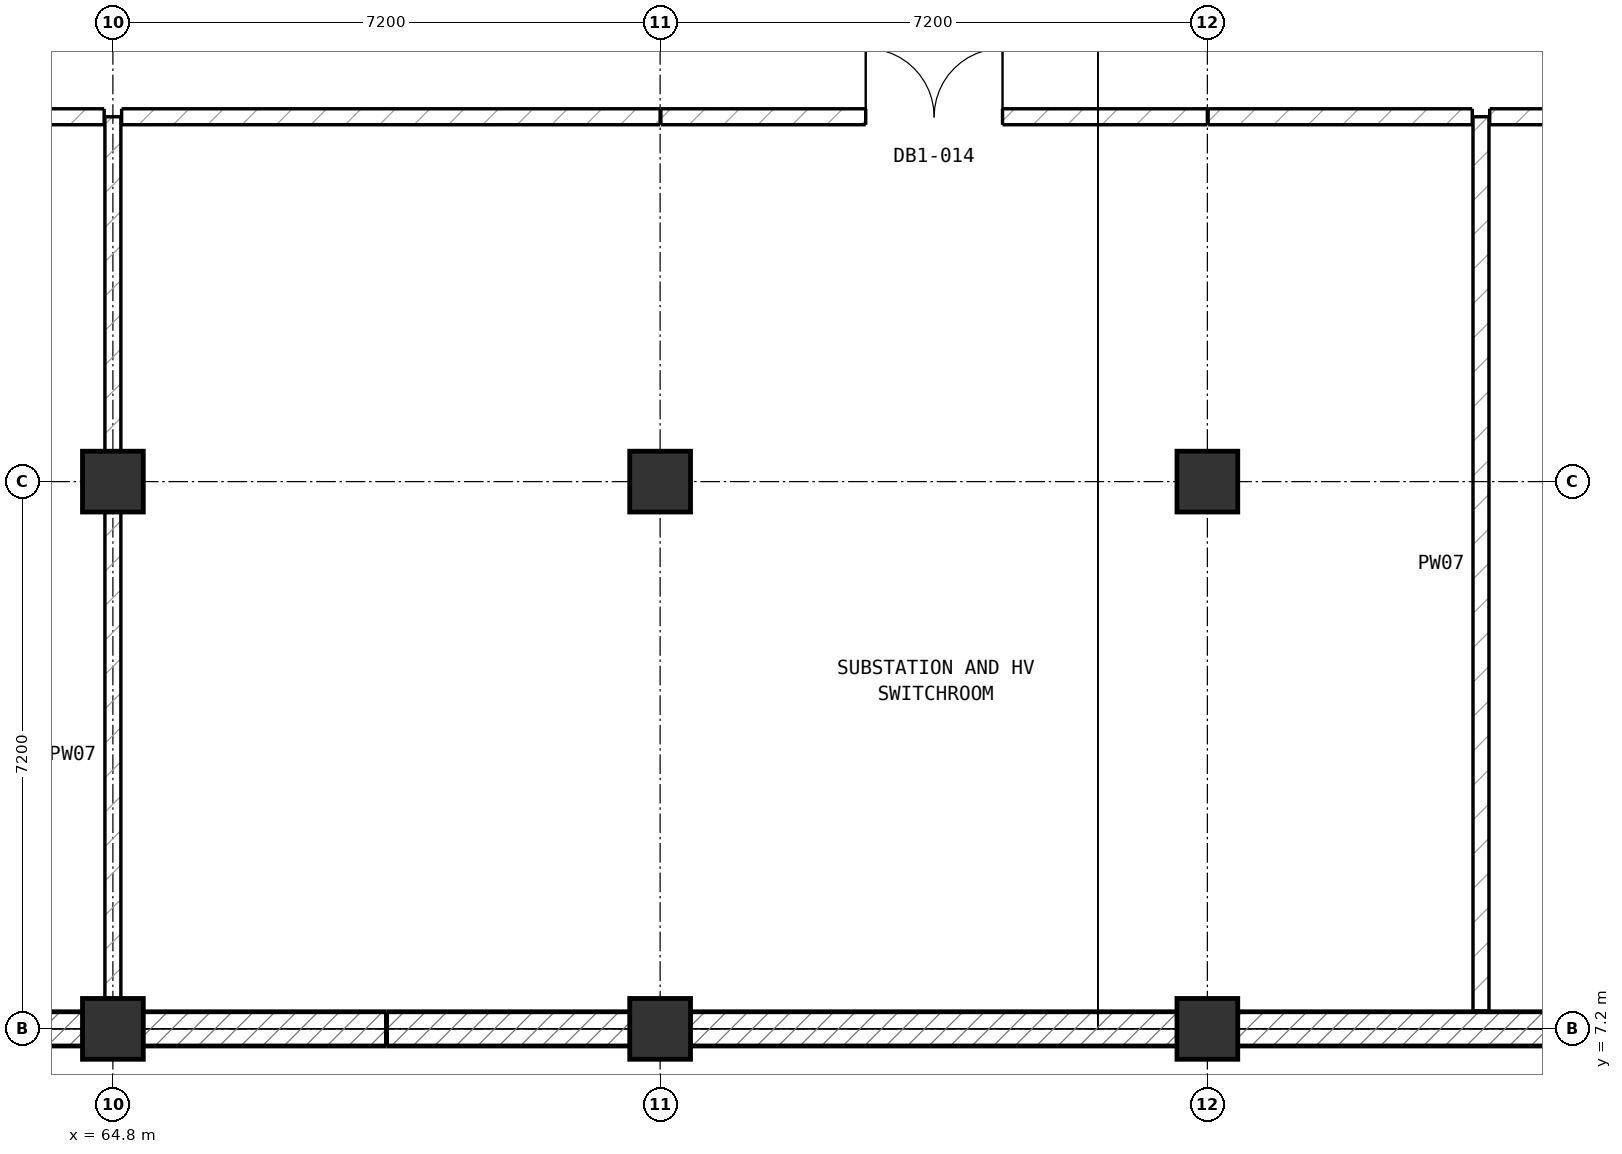
"""IFC4 building model, lengths in metres.
Left out: names, types, materials, properties, quantities, classifications, styles, units other than length and angle.
Written with IfcOpenShell. Run it as: python <this file> out.ifc"""

import sys

from ifc_helpers import new_model, si_unit, direction, frame, frame_2d, origin, origin_2d, place, context, subcontext, project, spatial, rectangle, extrude, element, fill, save


model = new_model("IFC4")
c1 = context("Model", 3, precision=1e-05, world=origin(), true_north=direction((0.0, 1.0)))
c2 = subcontext(c1, "Body", "Model", "MODEL_VIEW")
j1 = project(units=[si_unit("LENGTHUNIT", "METRE"), si_unit("PLANEANGLEUNIT", "RADIAN")], contexts=[c1])
p1 = place(None, origin())
s1 = spatial("IfcSite", under=j1, at=p1, CompositionType="ELEMENT")
p2 = place(p1, origin())
s2 = spatial("IfcBuilding", under=s1, at=p2, CompositionType="ELEMENT")
p3 = place(p2, frame((0.0, 0.0, -4.5)))
s3 = spatial("IfcBuildingStorey", under=s2, at=p3, CompositionType="ELEMENT", Elevation=-4.5)
for number, where, z_axis, x_axis in (
    (1, (64.8, 7.2, 0.0), (0.0, 0.0, 1.0), (1.0, 0.0, 0.0)),
    (2, (64.8, 14.4, 0.0), (0.0, 0.0, 1.0), (1.0, 0.0, 0.0)),
    (3, (72.0, 7.2, 0.0), (0.0, 0.0, 1.0), (1.0, 0.0, 0.0)),
    (4, (72.0, 14.4, 0.0), (0.0, 0.0, 1.0), (1.0, 0.0, 0.0)),
    (5, (79.2, 7.2, 0.0), (0.0, 0.0, 1.0), (1.0, 0.0, 0.0)),
    (6, (79.2, 14.4, 0.0), (0.0, 0.0, 1.0), (1.0, 0.0, 0.0)),
):
    element("IfcColumn", number, at=place(p3, frame(where, z_axis=z_axis, x_axis=x_axis)), inside=s3, PredefinedType="COLUMN", context=c2, shape_type="SweptSolid", body=[
        extrude(rectangle(XDim=0.8, YDim=0.8, at=origin_2d()), origin(), (0.0, 0.0, 1.0), 4.5),
    ])
for number, where, z_axis, x_axis in (
    (7, (115.4, 7.2, 0.0), (0.0, 0.0, 1.0), (-1.0, 0.0, 0.0)),
    (8, (68.4, 7.2, 0.0), (0.0, 0.0, 1.0), (-1.0, 0.0, 0.0)),
):
    element("IfcWall", number, at=place(p3, frame(where, z_axis=z_axis, x_axis=x_axis)), inside=s3, PredefinedType="USERDEFINED", context=c2, shape_type="SweptSolid", body=[
        extrude(rectangle(XDim=47.0, YDim=0.45, at=frame_2d((23.5, 0.0))), origin(), (0.0, 0.0, 1.0), 4.15),
    ])
p4 = place(p3, frame((64.8, 7.6, 0.0), z_axis=(0.0, 0.0, 1.0), x_axis=(0.0, 1.0, 0.0)))
e9 = element("IfcWall", 9, at=p4, inside=s3, PredefinedType="PARTITIONING", context=c2, shape_type="SweptSolid", body=[
    extrude(rectangle(XDim=6.4, YDim=0.21, at=frame_2d((3.2, 0.0))), origin(), (0.0, 0.0, 1.0), 3.78),
])
p5 = place(p3, frame((64.8, 14.8, 0.0), z_axis=(0.0, 0.0, 1.0), x_axis=(0.0, 1.0, 0.0)))
e10 = element("IfcWall", 10, at=p5, inside=s3, PredefinedType="PARTITIONING", context=c2, shape_type="SweptSolid", body=[
    extrude(rectangle(XDim=4.4, YDim=0.21, at=frame_2d((2.2, 0.0))), origin(), (0.0, 0.0, 1.0), 3.78),
])
p6 = place(p3, frame((82.8, 7.435, 0.0), z_axis=(0.0, 0.0, 1.0), x_axis=(0.0, 1.0, 0.0)))
e11 = element("IfcWall", 11, at=p6, inside=s3, PredefinedType="PARTITIONING", context=c2, shape_type="SweptSolid", body=[
    extrude(rectangle(XDim=11.765, YDim=0.21, at=frame_2d((5.882, 0.0))), origin(), (0.0, 0.0, 1.0), 4.06),
])
p7 = place(p3, frame((57.61, 19.2, 0.0), z_axis=(0.0, 0.0, 1.0), x_axis=(1.0, 0.0, 0.0)))
e12 = element("IfcWall", 12, at=p7, inside=s3, PredefinedType="PARTITIONING", context=c2, shape_type="SweptSolid", body=[
    extrude(rectangle(XDim=7.075, YDim=0.21, at=frame_2d((3.538, 0.0))), origin(), (0.0, 0.0, 1.0), 4.06),
])
p8 = place(p3, frame((64.915, 19.2, 0.0), z_axis=(0.0, 0.0, 1.0), x_axis=(1.0, 0.0, 0.0)))
e13 = element("IfcWall", 13, at=p8, inside=s3, PredefinedType="PARTITIONING", context=c2, shape_type="SweptSolid", body=[
    extrude(rectangle(XDim=7.085, YDim=0.21, at=frame_2d((3.542, 0.0))), origin(), (0.0, 0.0, 1.0), 4.06),
])
p9 = place(p3, frame((72.01, 19.2, 0.0), z_axis=(0.0, 0.0, 1.0), x_axis=(1.0, 0.0, 0.0)))
e14 = element("IfcWall", 14, at=p9, inside=s3, PredefinedType="PARTITIONING", context=c2, shape_type="SweptSolid", body=[
    extrude(rectangle(XDim=7.19, YDim=0.21, at=frame_2d((3.595, 0.0))), origin(), (0.0, 0.0, 1.0), 4.06),
])
p10 = place(p9, frame((2.695, 0.0, 0.0)))
e15 = element("IfcOpeningElement", 15, at=p10, cuts=e14, PredefinedType="OPENING", context=c2, shape_type="SweptSolid", body=[
    extrude(rectangle(XDim=1.8, YDim=2.4, at=frame_2d((0.9, 1.2))), frame((0.0, 0.115, 0.0), z_axis=(0.0, -1.0, 0.0), x_axis=(1.0, 0.0, 0.0)), (0.0, 0.0, 1.0), 0.23),
])
p11 = place(p3, frame((79.21, 19.2, 0.0), z_axis=(0.0, 0.0, 1.0), x_axis=(1.0, 0.0, 0.0)))
e16 = element("IfcWall", 16, at=p11, inside=s3, PredefinedType="PARTITIONING", context=c2, shape_type="SweptSolid", body=[
    extrude(rectangle(XDim=3.475, YDim=0.21, at=frame_2d((1.738, 0.0))), origin(), (0.0, 0.0, 1.0), 4.06),
])
p12 = place(p3, frame((82.915, 19.2, 0.0), z_axis=(0.0, 0.0, 1.0), x_axis=(1.0, 0.0, 0.0)))
e17 = element("IfcWall", 17, at=p12, inside=s3, PredefinedType="PARTITIONING", context=c2, shape_type="SweptSolid", body=[
    extrude(rectangle(XDim=3.485, YDim=0.21, at=frame_2d((1.742, 0.0))), origin(), (0.0, 0.0, 1.0), 4.06),
])
p13 = place(p10, origin())
e18 = element("IfcDoor", 18, at=p13, inside=s3, OperationType="DOUBLE_DOOR_SINGLE_SWING", PredefinedType="DOOR", context=c2, shape_type="SweptSolid", body=[
    extrude(rectangle(XDim=1.8, YDim=2.4, at=frame_2d((0.9, 1.2))), frame((0.0, 0.025, 0.0), z_axis=(0.0, -1.0, 0.0), x_axis=(1.0, 0.0, 0.0)), (0.0, 0.0, 1.0), 0.05),
])
fill(e15, e18)
save(model, sys.argv[1])
